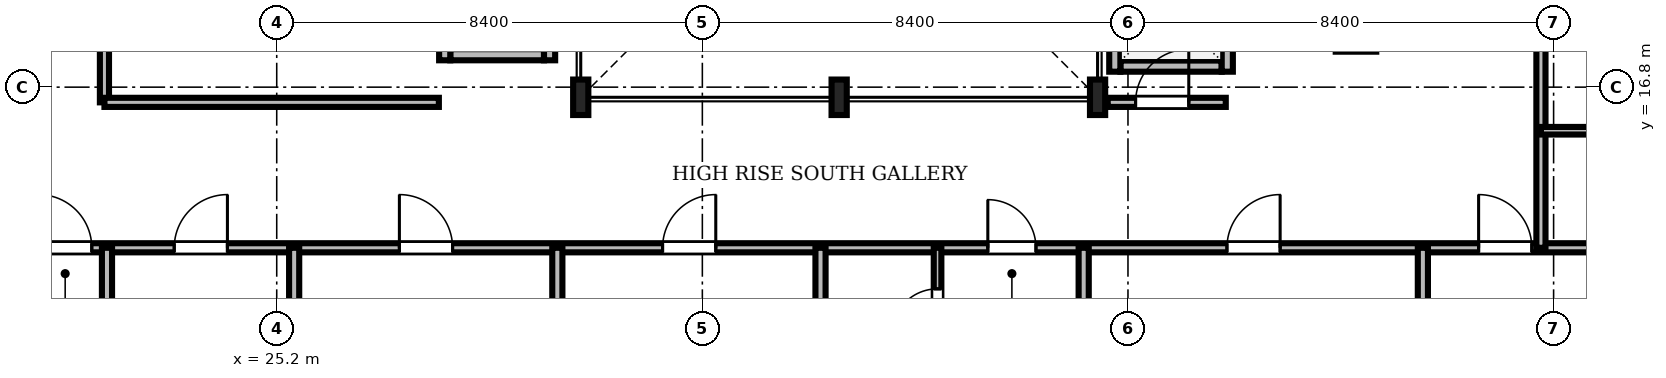
"""IFC4 building model, lengths in metres.
Left out: names, types, materials, properties, quantities, classifications, styles, units other than length and angle.
Written with IfcOpenShell. Run it as: python <this file> out.ifc"""

import sys

from ifc_helpers import new_model, si_unit, direction, frame, frame_2d, origin, origin_2d, place, context, subcontext, project, spatial, rectangle, i_section, extrude, source, transform, mapped, element, fill, save


model = new_model("IFC4")
c1 = context("Model", 3, precision=1e-05, world=origin(), true_north=direction((0.0, 1.0)))
c2 = subcontext(c1, "Body", "Model", "MODEL_VIEW")
j1 = project(units=[si_unit("LENGTHUNIT", "METRE"), si_unit("PLANEANGLEUNIT", "RADIAN")], contexts=[c1])
p1 = place(None, origin())
s1 = spatial("IfcSite", under=j1, at=p1, CompositionType="ELEMENT")
p2 = place(p1, origin())
s2 = spatial("IfcBuilding", under=s1, at=p2, CompositionType="ELEMENT")
p3 = place(p2, frame((0.0, 0.0, 199.8)))
s3 = spatial("IfcBuildingStorey", under=s2, at=p3, CompositionType="ELEMENT", Elevation=199.8)
m1 = source(origin(), c2, "Body", "SweptSolid", [
    extrude(i_section(OverallWidth=0.3, OverallDepth=0.7, WebThickness=0.017, FlangeThickness=0.032, FilletRadius=0.027, at=origin_2d()), origin(), (0.0, 0.0, 1.0), 3.53),
])
for number, where, z_axis, x_axis in (
    (1, (31.2, 16.6, 0.0), (0.0, 0.0, 1.0), (1.0, 0.0, 0.0)),
    (2, (36.3, 16.6, 0.0), (0.0, 0.0, 1.0), (1.0, 0.0, 0.0)),
    (3, (41.4, 16.6, 0.0), (0.0, 0.0, 1.0), (1.0, 0.0, 0.0)),
):
    element("IfcColumn", number, at=place(p3, frame(where, z_axis=z_axis, x_axis=x_axis)), inside=s3, PredefinedType="COLUMN", context=c2, shape_type="MappedRepresentation", body=[
        mapped(m1, transform((0.0, 0.0, 0.0), scale=1.0)),
    ])
m2 = source(origin(), c2, "Body", "SweptSolid", [
    extrude(rectangle(XDim=2.0, YDim=0.22, at=frame_2d((1.0, 0.0))), origin(), (0.0, 0.0, 1.0), 3.53),
])
p4 = place(p3, frame((41.85, 17.215, 0.0), z_axis=(0.0, 0.0, 1.0), x_axis=(1.0, 0.0, 0.0)))
e4 = element("IfcWall", 4, at=p4, inside=s3, PredefinedType="SOLIDWALL", context=c2, shape_type="MappedRepresentation", body=[
    mapped(m2, transform((0.0, 0.0, 0.0), scale=1.0)),
])
m3 = source(origin(), c2, "Body", "SweptSolid", [
    extrude(rectangle(XDim=2.19, YDim=0.22, at=frame_2d((1.095, 0.0))), origin(), (0.0, 0.0, 1.0), 3.53),
])
p5 = place(p3, frame((41.74, 17.105, 0.0), z_axis=(0.0, 0.0, 1.0), x_axis=(0.0, 1.0, 0.0)))
e5 = element("IfcWall", 5, at=p5, inside=s3, PredefinedType="SOLIDWALL", context=c2, shape_type="MappedRepresentation", body=[
    mapped(m3, transform((0.0, 0.0, 0.0), scale=1.0)),
])
p6 = place(p3, frame((43.96, 17.105, 0.0), z_axis=(0.0, 0.0, 1.0), x_axis=(0.0, 1.0, 0.0)))
e6 = element("IfcWall", 6, at=p6, inside=s3, PredefinedType="SOLIDWALL", context=c2, shape_type="MappedRepresentation", body=[
    mapped(m3, transform((0.0, 0.0, 0.0), scale=1.0)),
])
m4 = source(origin(), c2, "Body", "SweptSolid", [
    extrude(rectangle(XDim=1.1, YDim=2.2, at=frame_2d((0.55, 1.1))), frame((0.0, 0.12, 0.0), z_axis=(0.0, -1.0, 0.0), x_axis=(1.0, 0.0, 0.0)), (0.0, 0.0, 1.0), 0.24),
])
p7 = place(p6, frame((0.545, 0.0, 0.0)))
e7 = element("IfcOpeningElement", 7, at=p7, cuts=e6, PredefinedType="OPENING", context=c2, shape_type="MappedRepresentation", body=[
    mapped(m4, transform((0.0, 0.0, 0.0), scale=1.0)),
])
m5 = source(origin(), c2, "Body", "SweptSolid", [
    extrude(rectangle(XDim=1.85, YDim=0.22, at=frame_2d((0.925, 0.0))), origin(), (0.0, 0.0, 1.0), 2.972),
])
p8 = place(p3, frame((28.625, 17.44, 0.0), z_axis=(0.0, 0.0, 1.0), x_axis=(1.0, 0.0, 0.0)))
e8 = element("IfcWall", 8, at=p8, inside=s3, PredefinedType="SOLIDWALL", context=c2, shape_type="MappedRepresentation", body=[
    mapped(m5, transform((0.0, 0.0, 0.0), scale=1.0)),
])
m6 = source(origin(), c2, "Body", "SweptSolid", [
    extrude(rectangle(XDim=2.54, YDim=0.22, at=frame_2d((1.27, 0.0))), origin(), (0.0, 0.0, 1.0), 2.972),
])
p9 = place(p3, frame((28.515, 17.33, 0.0), z_axis=(0.0, 0.0, 1.0), x_axis=(0.0, 1.0, 0.0)))
e9 = element("IfcWall", 9, at=p9, inside=s3, PredefinedType="SOLIDWALL", context=c2, shape_type="MappedRepresentation", body=[
    mapped(m6, transform((0.0, 0.0, 0.0), scale=1.0)),
])
m7 = source(origin(), c2, "Body", "SweptSolid", [
    extrude(rectangle(XDim=2.54, YDim=0.22, at=frame_2d((1.27, 0.0))), origin(), (0.0, 0.0, 1.0), 3.53),
])
p10 = place(p3, frame((30.585, 17.33, 0.0), z_axis=(0.0, 0.0, 1.0), x_axis=(0.0, 1.0, 0.0)))
e10 = element("IfcWall", 10, at=p10, inside=s3, PredefinedType="SOLIDWALL", context=c2, shape_type="MappedRepresentation", body=[
    mapped(m7, transform((0.0, 0.0, 0.0), scale=1.0)),
])
m8 = source(origin(), c2, "Body", "SweptSolid", [
    extrude(rectangle(XDim=46.156, YDim=0.18, at=frame_2d((23.078, 0.0))), origin(), (0.0, 0.0, 1.0), 2.772),
])
p11 = place(p3, frame((11.422, 13.63, 0.0), z_axis=(0.0, 0.0, 1.0), x_axis=(1.0, 0.0, 0.0)))
e11 = element("IfcWall", 11, at=p11, inside=s3, PredefinedType="PARTITIONING", context=c2, shape_type="MappedRepresentation", body=[
    mapped(m8, transform((0.0, 0.0, 0.0), scale=1.0)),
])
m9 = source(origin(), c2, "Body", "SweptSolid", [
    extrude(rectangle(XDim=1.05, YDim=2.2, at=frame_2d((0.525, 1.1))), frame((0.0, 0.1, 0.0), z_axis=(0.0, -1.0, 0.0), x_axis=(1.0, 0.0, 0.0)), (0.0, 0.0, 1.0), 0.2),
])
p12 = place(p11, frame((9.078, 0.0, 0.0)))
e12 = element("IfcOpeningElement", 12, at=p12, cuts=e11, PredefinedType="OPENING", context=c2, shape_type="MappedRepresentation", body=[
    mapped(m9, transform((0.0, 0.0, 0.0), scale=1.0)),
])
p13 = place(p11, frame((11.755, 0.0, 0.0)))
e13 = element("IfcOpeningElement", 13, at=p13, cuts=e11, PredefinedType="OPENING", context=c2, shape_type="MappedRepresentation", body=[
    mapped(m9, transform((0.0, 0.0, 0.0), scale=1.0)),
])
p14 = place(p11, frame((16.199, 0.0, 0.0)))
e14 = element("IfcOpeningElement", 14, at=p14, cuts=e11, PredefinedType="OPENING", context=c2, shape_type="MappedRepresentation", body=[
    mapped(m9, transform((0.0, 0.0, 0.0), scale=1.0)),
])
p15 = place(p11, frame((21.393, 0.0, 0.0)))
e15 = element("IfcOpeningElement", 15, at=p15, cuts=e11, PredefinedType="OPENING", context=c2, shape_type="MappedRepresentation", body=[
    mapped(m9, transform((0.0, 0.0, 0.0), scale=1.0)),
])
m10 = source(origin(), c2, "Body", "SweptSolid", [
    extrude(rectangle(XDim=0.95, YDim=2.15, at=frame_2d((0.475, 1.075))), frame((0.0, 0.1, 0.0), z_axis=(0.0, -1.0, 0.0), x_axis=(1.0, 0.0, 0.0)), (0.0, 0.0, 1.0), 0.2),
])
p16 = place(p11, frame((27.812, 0.0, 0.0)))
e16 = element("IfcOpeningElement", 16, at=p16, cuts=e11, PredefinedType="OPENING", context=c2, shape_type="MappedRepresentation", body=[
    mapped(m10, transform((0.0, 0.0, 0.0), scale=1.0)),
])
p17 = place(p11, frame((32.531, 0.0, 0.0)))
e17 = element("IfcOpeningElement", 17, at=p17, cuts=e11, PredefinedType="OPENING", context=c2, shape_type="MappedRepresentation", body=[
    mapped(m9, transform((0.0, 0.0, 0.0), scale=1.0)),
])
p18 = place(p11, frame((37.498, 0.0, 0.0)))
e18 = element("IfcOpeningElement", 18, at=p18, cuts=e11, PredefinedType="OPENING", context=c2, shape_type="MappedRepresentation", body=[
    mapped(m9, transform((0.0, 0.0, 0.0), scale=1.0)),
])
m11 = source(origin(), c2, "Body", "SweptSolid", [
    extrude(rectangle(XDim=27.47, YDim=0.18, at=frame_2d((13.735, 0.0))), origin(), (0.0, 0.0, 1.0), 2.972),
])
p19 = place(p3, frame((50.15, 13.63, 0.0), z_axis=(0.0, 0.0, 1.0), x_axis=(0.0, 1.0, 0.0)))
e19 = element("IfcWall", 19, at=p19, inside=s3, PredefinedType="PARTITIONING", context=c2, shape_type="MappedRepresentation", body=[
    mapped(m11, transform((0.0, 0.0, 0.0), scale=1.0)),
])
p20 = place(p19, frame((4.071, 0.0, 0.0)))
e20 = element("IfcOpeningElement", 20, at=p20, cuts=e19, PredefinedType="OPENING", context=c2, shape_type="MappedRepresentation", body=[
    mapped(m9, transform((0.0, 0.0, 0.0), scale=1.0)),
])
p21 = place(p19, frame((10.884, 0.0, 0.0)))
e21 = element("IfcOpeningElement", 21, at=p21, cuts=e19, PredefinedType="OPENING", context=c2, shape_type="MappedRepresentation", body=[
    mapped(m9, transform((0.0, 0.0, 0.0), scale=1.0)),
])
p22 = place(p19, frame((17.696, 0.0, 0.0)))
e22 = element("IfcOpeningElement", 22, at=p22, cuts=e19, PredefinedType="OPENING", context=c2, shape_type="MappedRepresentation", body=[
    mapped(m9, transform((0.0, 0.0, 0.0), scale=1.0)),
])
p23 = place(p19, frame((24.509, 0.0, 0.0)))
e23 = element("IfcOpeningElement", 23, at=p23, cuts=e19, PredefinedType="OPENING", context=c2, shape_type="MappedRepresentation", body=[
    mapped(m9, transform((0.0, 0.0, 0.0), scale=1.0)),
])
m12 = source(origin(), c2, "Body", "SweptSolid", [
    extrude(rectangle(XDim=11.94, YDim=0.18, at=frame_2d((5.97, 0.0))), origin(), (0.0, 0.0, 1.0), 2.972),
])
p24 = place(p3, frame((21.8, 16.5, 0.0), z_axis=(0.0, 0.0, 1.0), x_axis=(0.0, 1.0, 0.0)))
e24 = element("IfcWall", 24, at=p24, inside=s3, PredefinedType="PARTITIONING", context=c2, shape_type="MappedRepresentation", body=[
    mapped(m12, transform((0.0, 0.0, 0.0), scale=1.0)),
])
p25 = place(p24, frame((4.5, 0.0, 0.0)))
e25 = element("IfcOpeningElement", 25, at=p25, cuts=e24, PredefinedType="OPENING", context=c2, shape_type="MappedRepresentation", body=[
    mapped(m9, transform((0.0, 0.0, 0.0), scale=1.0)),
])
m13 = source(origin(), c2, "Body", "SweptSolid", [
    extrude(rectangle(XDim=2.36, YDim=0.15, at=frame_2d((1.18, 0.0))), origin(), (0.0, 0.0, 1.0), 3.192),
])
p26 = place(p3, frame((38.242, 11.27, 0.0), z_axis=(0.0, 0.0, 1.0), x_axis=(0.0, 1.0, 0.0)))
e26 = element("IfcWall", 26, at=p26, inside=s3, PredefinedType="PARTITIONING", context=c2, shape_type="MappedRepresentation", body=[
    mapped(m13, transform((0.0, 0.0, 0.0), scale=1.0)),
])
m14 = source(origin(), c2, "Body", "SweptSolid", [
    extrude(rectangle(XDim=0.9, YDim=2.1, at=frame_2d((0.45, 1.05))), frame((0.0, 0.085, 0.0), z_axis=(0.0, -1.0, 0.0), x_axis=(1.0, 0.0, 0.0)), (0.0, 0.0, 1.0), 0.17),
])
p27 = place(p26, frame((0.65, 0.0, 0.0)))
e27 = element("IfcOpeningElement", 27, at=p27, cuts=e26, PredefinedType="OPENING", context=c2, shape_type="MappedRepresentation", body=[
    mapped(m14, transform((0.0, 0.0, 0.0), scale=1.0)),
])
m15 = source(origin(), c2, "Body", "SweptSolid", [
    extrude(rectangle(XDim=2.33, YDim=0.18, at=frame_2d((1.165, 0.0))), origin(), (0.0, 0.0, 1.0), 2.972),
])
p28 = place(p3, frame((41.6, 16.5, 0.0), z_axis=(0.0, 0.0, 1.0), x_axis=(1.0, 0.0, 0.0)))
e28 = element("IfcWall", 28, at=p28, inside=s3, PredefinedType="PARTITIONING", context=c2, shape_type="MappedRepresentation", body=[
    mapped(m15, transform((0.0, 0.0, 0.0), scale=1.0)),
])
p29 = place(p28, frame((0.55, 0.0, 0.0)))
e29 = element("IfcOpeningElement", 29, at=p29, cuts=e28, PredefinedType="OPENING", context=c2, shape_type="MappedRepresentation", body=[
    mapped(m9, transform((0.0, 0.0, 0.0), scale=1.0)),
])
m16 = source(origin(), c2, "Body", "SweptSolid", [
    extrude(rectangle(XDim=11.508, YDim=0.2, at=frame_2d((5.754, 0.0))), origin(), (0.0, 0.0, 1.0), 2.772),
])
for number, where, z_axis, x_axis in (
    (30, (21.85, 2.122, 0.0), (0.0, 0.0, 1.0), (0.0, 1.0, 0.0)),
    (31, (25.544, 2.122, 0.0), (0.0, 0.0, 1.0), (0.0, 1.0, 0.0)),
    (32, (30.738, 2.122, 0.0), (0.0, 0.0, 1.0), (0.0, 1.0, 0.0)),
):
    element("IfcWall", number, at=place(p3, frame(where, z_axis=z_axis, x_axis=x_axis)), inside=s3, PredefinedType="PARTITIONING", context=c2, shape_type="MappedRepresentation", body=[
        mapped(m16, transform((0.0, 0.0, 0.0), scale=1.0)),
    ])
m17 = source(origin(), c2, "Body", "SweptSolid", [
    extrude(rectangle(XDim=11.7, YDim=0.2, at=frame_2d((5.85, 0.0))), origin(), (0.0, 0.0, 1.0), 2.772),
])
p30 = place(p3, frame((35.932, 1.93, 0.0), z_axis=(0.0, 0.0, 1.0), x_axis=(0.0, 1.0, 0.0)))
e33 = element("IfcWall", 33, at=p30, inside=s3, PredefinedType="PARTITIONING", context=c2, shape_type="MappedRepresentation", body=[
    mapped(m17, transform((0.0, 0.0, 0.0), scale=1.0)),
])
for number, where, z_axis, x_axis in (
    (34, (41.126, 2.122, 0.0), (0.0, 0.0, 1.0), (0.0, 1.0, 0.0)),
    (35, (47.82, 2.122, 0.0), (0.0, 0.0, 1.0), (0.0, 1.0, 0.0)),
):
    element("IfcWall", number, at=place(p3, frame(where, z_axis=z_axis, x_axis=x_axis)), inside=s3, PredefinedType="PARTITIONING", context=c2, shape_type="MappedRepresentation", body=[
        mapped(m16, transform((0.0, 0.0, 0.0), scale=1.0)),
    ])
m18 = source(origin(), c2, "Body", "SweptSolid", [
    extrude(rectangle(XDim=6.6, YDim=0.18, at=frame_2d((3.3, 0.0))), origin(), (0.0, 0.0, 1.0), 3.53),
])
p31 = place(p3, frame((21.8, 16.5, 0.0), z_axis=(0.0, 0.0, 1.0), x_axis=(1.0, 0.0, 0.0)))
e36 = element("IfcWall", 36, at=p31, inside=s3, PredefinedType="PARTITIONING", context=c2, shape_type="MappedRepresentation", body=[
    mapped(m18, transform((0.0, 0.0, 0.0), scale=1.0)),
])
m19 = source(origin(), c2, "Body", "SweptSolid", [
    extrude(rectangle(XDim=2.36, YDim=0.15, at=frame_2d((1.18, 0.0))), origin(), (0.0, 0.0, 1.0), 3.53),
])
p32 = place(p3, frame((50.15, 15.94, 0.0), z_axis=(0.0, 0.0, 1.0), x_axis=(1.0, 0.0, 0.0)))
e37 = element("IfcWall", 37, at=p32, inside=s3, PredefinedType="PARTITIONING", context=c2, shape_type="MappedRepresentation", body=[
    mapped(m19, transform((0.0, 0.0, 0.0), scale=1.0)),
])
m20 = source(origin(), c2, "Body", "SweptSolid", [
    extrude(rectangle(XDim=1.05, YDim=2.2, at=frame_2d((0.525, 1.1))), frame((0.0, 0.025, 0.0), z_axis=(0.0, -1.0, 0.0), x_axis=(1.0, 0.0, 0.0)), (0.0, 0.0, 1.0), 0.05),
])
p33 = place(p12, origin())
e38 = element("IfcDoor", 38, at=p33, inside=s3, OperationType="SINGLE_SWING_LEFT", PredefinedType="DOOR", context=c2, shape_type="MappedRepresentation", body=[
    mapped(m20, transform((0.0, 0.0, 0.0), scale=1.0)),
])
fill(e12, e38)
p34 = place(p13, origin())
e39 = element("IfcDoor", 39, at=p34, inside=s3, OperationType="SINGLE_SWING_RIGHT", PredefinedType="DOOR", context=c2, shape_type="MappedRepresentation", body=[
    mapped(m20, transform((0.0, 0.0, 0.0), scale=1.0)),
])
fill(e13, e39)
p35 = place(p14, origin())
e40 = element("IfcDoor", 40, at=p35, inside=s3, OperationType="SINGLE_SWING_LEFT", PredefinedType="DOOR", context=c2, shape_type="MappedRepresentation", body=[
    mapped(m20, transform((0.0, 0.0, 0.0), scale=1.0)),
])
fill(e14, e40)
p36 = place(p15, origin())
e41 = element("IfcDoor", 41, at=p36, inside=s3, OperationType="SINGLE_SWING_RIGHT", PredefinedType="DOOR", context=c2, shape_type="MappedRepresentation", body=[
    mapped(m20, transform((0.0, 0.0, 0.0), scale=1.0)),
])
fill(e15, e41)
m21 = source(origin(), c2, "Body", "SweptSolid", [
    extrude(rectangle(XDim=0.95, YDim=2.15, at=frame_2d((0.475, 1.075))), frame((0.0, 0.025, 0.0), z_axis=(0.0, -1.0, 0.0), x_axis=(1.0, 0.0, 0.0)), (0.0, 0.0, 1.0), 0.05),
])
p37 = place(p16, origin())
e42 = element("IfcDoor", 42, at=p37, inside=s3, OperationType="SINGLE_SWING_LEFT", PredefinedType="DOOR", context=c2, shape_type="MappedRepresentation", body=[
    mapped(m21, transform((0.0, 0.0, 0.0), scale=1.0)),
])
fill(e16, e42)
p38 = place(p17, origin())
e43 = element("IfcDoor", 43, at=p38, inside=s3, OperationType="SINGLE_SWING_RIGHT", PredefinedType="DOOR", context=c2, shape_type="MappedRepresentation", body=[
    mapped(m20, transform((0.0, 0.0, 0.0), scale=1.0)),
])
fill(e17, e43)
p39 = place(p18, origin())
e44 = element("IfcDoor", 44, at=p39, inside=s3, OperationType="SINGLE_SWING_LEFT", PredefinedType="DOOR", context=c2, shape_type="MappedRepresentation", body=[
    mapped(m20, transform((0.0, 0.0, 0.0), scale=1.0)),
])
fill(e18, e44)
m22 = source(origin(), c2, "Body", "SweptSolid", [
    extrude(rectangle(XDim=0.9, YDim=2.1, at=frame_2d((0.45, 1.05))), frame((0.0, 0.025, 0.0), z_axis=(0.0, -1.0, 0.0), x_axis=(1.0, 0.0, 0.0)), (0.0, 0.0, 1.0), 0.05),
])
p40 = place(p27, origin())
e45 = element("IfcDoor", 45, at=p40, inside=s3, OperationType="SINGLE_SWING_LEFT", PredefinedType="DOOR", context=c2, shape_type="MappedRepresentation", body=[
    mapped(m22, transform((0.0, 0.0, 0.0), scale=1.0)),
])
fill(e27, e45)
p41 = place(p29, origin())
e46 = element("IfcDoor", 46, at=p41, inside=s3, OperationType="SINGLE_SWING_RIGHT", PredefinedType="DOOR", context=c2, shape_type="MappedRepresentation", body=[
    mapped(m20, transform((0.0, 0.0, 0.0), scale=1.0)),
])
fill(e29, e46)
save(model, sys.argv[1])
